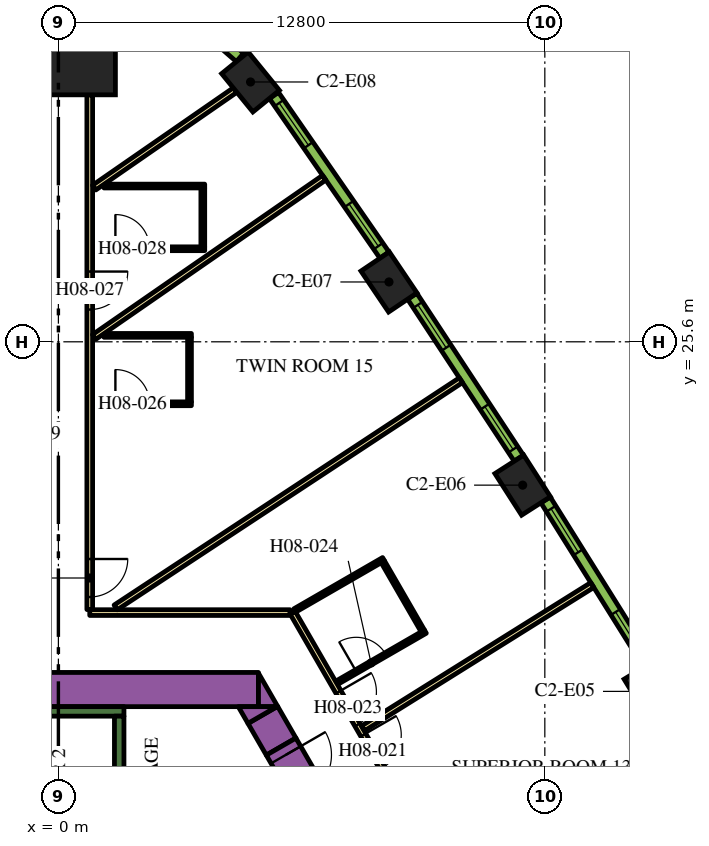
"""IFC4 building model, lengths in metres.
Left out: names, types, materials, properties, quantities, classifications, styles, units other than length and angle.
Written with IfcOpenShell. Run it as: python <this file> out.ifc"""

import sys

from ifc_helpers import new_model, si_unit, direction, frame, frame_2d, origin, origin_2d, place, context, subcontext, project, spatial, polyline, rectangle, outline, extrude, element, fill, save


model = new_model("IFC4")
c1 = context("Model", 3, precision=1e-05, world=origin(), true_north=direction((0.0, 1.0)))
c2 = subcontext(c1, "Body", "Model", "MODEL_VIEW")
j1 = project(units=[si_unit("LENGTHUNIT", "METRE"), si_unit("PLANEANGLEUNIT", "RADIAN")], contexts=[c1])
p1 = place(None, origin())
s1 = spatial("IfcSite", under=j1, at=p1, CompositionType="ELEMENT")
p2 = place(p1, origin())
s2 = spatial("IfcBuilding", under=s1, at=p2, CompositionType="ELEMENT")
p3 = place(p2, frame((0.0, 0.0, 107.1)))
s3 = spatial("IfcBuildingStorey", under=s2, at=p3, CompositionType="ELEMENT", Elevation=107.1)
p4 = place(p3, frame((0.0, 33.598, 0.0), z_axis=(0.0, 0.0, 1.0), x_axis=(0.0, 1.0, 0.0)))
e1 = element("IfcColumn", 1, at=p4, inside=s3, PredefinedType="COLUMN", context=c2, shape_type="SweptSolid", body=[
    extrude(rectangle(XDim=3.0, YDim=3.0, at=origin_2d()), origin(), (0.0, 0.0, 1.0), 3.9),
])
for number, where, z_axis, x_axis in (
    (2, (15.609, 16.402, 0.0), (0.0, 0.0, 1.0), (-0.52, 0.854, 0.0)),
    (3, (12.217, 21.828, 0.0), (0.0, 0.0, 1.0), (-0.54, 0.842, 0.0)),
    (4, (8.699, 27.174, 0.0), (0.0, 0.0, 1.0), (-0.559, 0.829, 0.0)),
    (5, (5.056, 32.437, 0.0), (0.0, 0.0, 1.0), (-0.632, 0.775, 0.0)),
):
    element("IfcColumn", number, at=place(p3, frame(where, z_axis=z_axis, x_axis=x_axis)), inside=s3, PredefinedType="COLUMN", context=c2, shape_type="SweptSolid", body=[
        extrude(rectangle(XDim=1.3, YDim=0.9, at=origin_2d()), origin(), (0.0, 0.0, 1.0), 3.9),
    ])
p5 = place(p3, frame((-4.224, 16.45, 0.0), z_axis=(0.0, 0.0, 1.0), x_axis=(1.0, 0.0, 0.0)))
e6 = element("IfcWall", 6, at=p5, inside=s3, PredefinedType="SOLIDWALL", context=c2, shape_type="SweptSolid", body=[
    extrude(rectangle(XDim=9.488, YDim=0.9, at=frame_2d((4.744, 0.0))), origin(), (0.0, 0.0, 1.0), 3.9),
])
p6 = place(p3, origin())
e7 = element("IfcWall", 7, at=p6, inside=s3, PredefinedType="SOLIDWALL", context=c2, shape_type="SweptSolid", body=[
    extrude(outline(polyline([(5.265, 16.0), (5.265, 16.88), (5.773, 16.0), (5.265, 16.0)])), origin(), (0.0, 0.0, 1.0), 3.9),
])
p7 = place(p3, frame((5.861, 14.949, 0.0), z_axis=(0.0, 0.0, 1.0), x_axis=(-0.50011719232, 0.865957732194, 0.0)))
e8 = element("IfcWall", 8, at=p7, inside=s3, PredefinedType="SOLIDWALL", context=c2, shape_type="SweptSolid", body=[
    extrude(rectangle(XDim=0.964, YDim=0.9, at=frame_2d((0.482, 0.0))), origin(), (0.0, 0.0, 1.0), 3.9),
])
e9 = element("IfcWall", 9, at=p6, inside=s3, PredefinedType="SOLIDWALL", context=c2, shape_type="SweptSolid", body=[
    extrude(outline(polyline([(4.734, 16.0), (5.75, 16.0), (4.988, 15.56), (4.734, 16.0)])), origin(), (0.0, 0.0, 1.0), 3.9),
])
p8 = place(p3, frame((-1.725, 15.875, 0.0), z_axis=(0.0, 0.0, 1.0), x_axis=(1.0, 0.0, 0.0)))
e10 = element("IfcWall", 10, at=p8, inside=s3, PredefinedType="SOLIDWALL", context=c2, shape_type="SweptSolid", body=[
    extrude(rectangle(XDim=3.45, YDim=0.25, at=frame_2d((1.725, 0.0))), origin(), (0.0, 0.0, 1.0), 3.9),
])
p9 = place(p3, frame((1.6, 8.95, 0.0), z_axis=(0.0, 0.0, 1.0), x_axis=(0.0, 1.0, 0.0)))
e11 = element("IfcWall", 11, at=p9, inside=s3, PredefinedType="SOLIDWALL", context=c2, shape_type="SweptSolid", body=[
    extrude(rectangle(XDim=6.8, YDim=0.25, at=frame_2d((3.4, 0.0))), origin(), (0.0, 0.0, 1.0), 3.9),
])
p10 = place(p3, frame((5.861, 14.948, 0.0), z_axis=(0.0, 0.0, 1.0), x_axis=(0.500062241894, -0.865989465428, 0.0)))
e12 = element("IfcWall", 12, at=p10, inside=s3, PredefinedType="SOLIDWALL", context=c2, shape_type="SweptSolid", body=[
    extrude(rectangle(XDim=1.7, YDim=0.9, at=frame_2d((0.85, 0.0))), origin(), (0.0, 0.0, 1.0), 3.9),
])
p11 = place(p10, frame((0.25, 0.0, 0.0)))
e13 = element("IfcOpeningElement", 13, at=p11, cuts=e12, PredefinedType="OPENING", context=c2, shape_type="SweptSolid", body=[
    extrude(rectangle(XDim=1.2, YDim=2.1, at=frame_2d((0.6, 1.05))), frame((0.0, 0.46, 0.0), z_axis=(0.0, -1.0, 0.0), x_axis=(1.0, 0.0, 0.0)), (0.0, 0.0, 1.0), 0.92),
])
p12 = place(p3, frame((6.163, 18.475, 0.0), z_axis=(0.0, 0.0, 1.0), x_axis=(0.500001317485, -0.866024643133, 0.0)))
e14 = element("IfcWall", 14, at=p12, inside=s3, PredefinedType="PARTITIONING", context=c2, shape_type="SweptSolid", body=[
    extrude(rectangle(XDim=25.767, YDim=0.15, at=frame_2d((12.883, 0.0))), origin(), (0.0, 0.0, 1.0), 2.75),
])
p13 = place(p12, frame((24.241, 0.0, 0.0)))
e15 = element("IfcOpeningElement", 15, at=p13, cuts=e14, PredefinedType="OPENING", context=c2, shape_type="SweptSolid", body=[
    extrude(rectangle(XDim=1.0, YDim=2.1, at=frame_2d((0.5, 1.05))), frame((0.0, 0.085, 0.0), z_axis=(0.0, -1.0, 0.0), x_axis=(1.0, 0.0, 0.0)), (0.0, 0.0, 1.0), 0.17),
])
p14 = place(p12, frame((13.144, 0.0, 0.0)))
e16 = element("IfcOpeningElement", 16, at=p14, cuts=e14, PredefinedType="OPENING", context=c2, shape_type="SweptSolid", body=[
    extrude(rectangle(XDim=1.0, YDim=2.1, at=frame_2d((0.5, 1.05))), frame((0.0, 0.085, 0.0), z_axis=(0.0, -1.0, 0.0), x_axis=(1.0, 0.0, 0.0)), (0.0, 0.0, 1.0), 0.17),
])
p15 = place(p12, frame((10.874, 0.0, 0.0)))
e17 = element("IfcOpeningElement", 17, at=p15, cuts=e14, PredefinedType="OPENING", context=c2, shape_type="SweptSolid", body=[
    extrude(rectangle(XDim=0.9, YDim=2.1, at=frame_2d((0.45, 1.05))), frame((0.0, 0.085, 0.0), z_axis=(0.0, -1.0, 0.0), x_axis=(1.0, 0.0, 0.0)), (0.0, 0.0, 1.0), 0.17),
])
p16 = place(p12, frame((3.718, 0.0, 0.0)))
e18 = element("IfcOpeningElement", 18, at=p16, cuts=e14, PredefinedType="OPENING", context=c2, shape_type="SweptSolid", body=[
    extrude(rectangle(XDim=1.0, YDim=2.1, at=frame_2d((0.5, 1.05))), frame((0.0, 0.085, 0.0), z_axis=(0.0, -1.0, 0.0), x_axis=(1.0, 0.0, 0.0)), (0.0, 0.0, 1.0), 0.17),
])
p17 = place(p12, frame((2.411, 0.0, 0.0)))
e19 = element("IfcOpeningElement", 19, at=p17, cuts=e14, PredefinedType="OPENING", context=c2, shape_type="SweptSolid", body=[
    extrude(rectangle(XDim=1.0, YDim=2.1, at=frame_2d((0.5, 1.05))), frame((0.0, 0.085, 0.0), z_axis=(0.0, -1.0, 0.0), x_axis=(1.0, 0.0, 0.0)), (0.0, 0.0, 1.0), 0.17),
])
p18 = place(p3, frame((0.825, 18.475, 0.0), z_axis=(0.0, 0.0, 1.0), x_axis=(1.0, 0.0, 0.0)))
e20 = element("IfcWall", 20, at=p18, inside=s3, PredefinedType="PARTITIONING", context=c2, shape_type="SweptSolid", body=[
    extrude(rectangle(XDim=5.268, YDim=0.15, at=frame_2d((2.634, 0.0))), origin(), (0.0, 0.0, 1.0), 2.75),
])
p19 = place(p3, frame((0.825, 32.098, 0.0), z_axis=(0.0, 0.0, 1.0), x_axis=(0.0, -1.0, 0.0)))
e21 = element("IfcWall", 21, at=p19, inside=s3, PredefinedType="PARTITIONING", context=c2, shape_type="SweptSolid", body=[
    extrude(rectangle(XDim=13.543, YDim=0.15, at=frame_2d((6.772, 0.0))), origin(), (0.0, 0.0, 1.0), 2.75),
])
p20 = place(p19, frame((12.213, 0.0, 0.0)))
e22 = element("IfcOpeningElement", 22, at=p20, cuts=e21, PredefinedType="OPENING", context=c2, shape_type="SweptSolid", body=[
    extrude(rectangle(XDim=1.0, YDim=2.1, at=frame_2d((0.5, 1.05))), frame((0.0, 0.085, 0.0), z_axis=(0.0, -1.0, 0.0), x_axis=(1.0, 0.0, 0.0)), (0.0, 0.0, 1.0), 0.17),
])
p21 = place(p19, frame((4.65, 0.0, 0.0)))
e23 = element("IfcOpeningElement", 23, at=p21, cuts=e21, PredefinedType="OPENING", context=c2, shape_type="SweptSolid", body=[
    extrude(rectangle(XDim=1.0, YDim=2.1, at=frame_2d((0.5, 1.05))), frame((0.0, 0.085, 0.0), z_axis=(0.0, -1.0, 0.0), x_axis=(1.0, 0.0, 0.0)), (0.0, 0.0, 1.0), 0.17),
])
p22 = place(p3, frame((6.994, 29.917, 0.0), z_axis=(0.0, 0.0, 1.0), x_axis=(-0.822255462494, -0.569118576747, 0.0)))
e24 = element("IfcWall", 24, at=p22, inside=s3, PredefinedType="PARTITIONING", context=c2, shape_type="SweptSolid", body=[
    extrude(rectangle(XDim=7.362, YDim=0.15, at=frame_2d((3.681, 0.0))), origin(), (0.0, 0.0, 1.0), 2.75),
])
p23 = place(p3, frame((10.592, 24.589, 0.0), z_axis=(0.0, 0.0, 1.0), x_axis=(-0.835337323748, -0.549737715236, 0.0)))
e25 = element("IfcWall", 25, at=p23, inside=s3, PredefinedType="PARTITIONING", context=c2, shape_type="SweptSolid", body=[
    extrude(rectangle(XDim=10.875, YDim=0.15, at=frame_2d((5.438, 0.0))), origin(), (0.0, 0.0, 1.0), 2.75),
])
p24 = place(p3, frame((4.649, 32.223, 0.0), z_axis=(0.0, 0.0, 1.0), x_axis=(-0.822262349475, -0.569108626394, 0.0)))
e26 = element("IfcWall", 26, at=p24, inside=s3, PredefinedType="PARTITIONING", context=c2, shape_type="SweptSolid", body=[
    extrude(rectangle(XDim=4.51, YDim=0.15, at=frame_2d((2.255, 0.0))), origin(), (0.0, 0.0, 1.0), 2.75),
])
p25 = place(p3, frame((14.049, 19.2, 0.0), z_axis=(0.0, 0.0, 1.0), x_axis=(-0.847955867271, -0.530066832731, 0.0)))
e27 = element("IfcWall", 27, at=p25, inside=s3, PredefinedType="PARTITIONING", context=c2, shape_type="SweptSolid", body=[
    extrude(rectangle(XDim=7.111, YDim=0.15, at=frame_2d((3.556, 0.0))), origin(), (0.0, 0.0, 1.0), 2.75),
])
p26 = place(p3, frame((7.318, 16.625, 0.0), z_axis=(0.0, 0.0, 1.0), x_axis=(0.866019956843, 0.50000943426, 0.0)))
e28 = element("IfcWall", 28, at=p26, inside=s3, PredefinedType="PARTITIONING", context=c2, shape_type="SweptSolid", body=[
    extrude(rectangle(XDim=2.7, YDim=0.1, at=frame_2d((1.35, 0.0))), origin(), (0.0, 0.0, 1.0), 2.75),
])
p27 = place(p26, frame((0.6, 0.0, 0.0)))
e29 = element("IfcOpeningElement", 29, at=p27, cuts=e28, PredefinedType="OPENING", context=c2, shape_type="SweptSolid", body=[
    extrude(rectangle(XDim=0.9, YDim=2.1, at=frame_2d((0.45, 1.05))), frame((0.0, 0.06, 0.0), z_axis=(0.0, -1.0, 0.0), x_axis=(1.0, 0.0, 0.0)), (0.0, 0.0, 1.0), 0.12),
])
p28 = place(p3, frame((9.588, 17.993, 0.0), z_axis=(0.0, 0.0, 1.0), x_axis=(-0.500027713859, 0.866009402589, 0.0)))
e30 = element("IfcWall", 30, at=p28, inside=s3, PredefinedType="PARTITIONING", context=c2, shape_type="SweptSolid", body=[
    extrude(rectangle(XDim=2.1, YDim=0.1, at=frame_2d((1.05, 0.0))), origin(), (0.0, 0.0, 1.0), 2.75),
])
p29 = place(p3, frame((6.218, 18.53, 0.0), z_axis=(0.0, 0.0, 1.0), x_axis=(0.86599734893, 0.500048589285, 0.0)))
e31 = element("IfcWall", 31, at=p29, inside=s3, PredefinedType="PARTITIONING", context=c2, shape_type="SweptSolid", body=[
    extrude(rectangle(XDim=2.7, YDim=0.1, at=frame_2d((1.35, 0.0))), origin(), (0.0, 0.0, 1.0), 2.75),
])
p30 = place(p3, frame((0.9, 23.969, 0.0), z_axis=(0.0, 0.0, 1.0), x_axis=(1.0, 0.0, 0.0)))
e32 = element("IfcWall", 32, at=p30, inside=s3, PredefinedType="PARTITIONING", context=c2, shape_type="SweptSolid", body=[
    extrude(rectangle(XDim=2.6, YDim=0.1, at=frame_2d((1.3, 0.0))), origin(), (0.0, 0.0, 1.0), 2.75),
])
p31 = place(p30, frame((0.6, 0.0, 0.0)))
e33 = element("IfcOpeningElement", 33, at=p31, cuts=e32, PredefinedType="OPENING", context=c2, shape_type="SweptSolid", body=[
    extrude(rectangle(XDim=0.9, YDim=2.1, at=frame_2d((0.45, 1.05))), frame((0.0, 0.06, 0.0), z_axis=(0.0, -1.0, 0.0), x_axis=(1.0, 0.0, 0.0)), (0.0, 0.0, 1.0), 0.12),
])
p32 = place(p3, frame((3.45, 24.019, 0.0), z_axis=(0.0, 0.0, 1.0), x_axis=(0.0, 1.0, 0.0)))
e34 = element("IfcWall", 34, at=p32, inside=s3, PredefinedType="PARTITIONING", context=c2, shape_type="SweptSolid", body=[
    extrude(rectangle(XDim=1.7, YDim=0.1, at=frame_2d((0.85, 0.0))), origin(), (0.0, 0.0, 1.0), 2.75),
])
p33 = place(p3, frame((1.2, 25.769, 0.0), z_axis=(0.0, 0.0, 1.0), x_axis=(1.0, 0.0, 0.0)))
e35 = element("IfcWall", 35, at=p33, inside=s3, PredefinedType="PARTITIONING", context=c2, shape_type="SweptSolid", body=[
    extrude(rectangle(XDim=2.3, YDim=0.1, at=frame_2d((1.15, 0.0))), origin(), (0.0, 0.0, 1.0), 2.75),
])
p34 = place(p3, frame((0.9, 28.048, 0.0), z_axis=(0.0, 0.0, 1.0), x_axis=(1.0, 0.0, 0.0)))
e36 = element("IfcWall", 36, at=p34, inside=s3, PredefinedType="PARTITIONING", context=c2, shape_type="SweptSolid", body=[
    extrude(rectangle(XDim=2.95, YDim=0.1, at=frame_2d((1.475, 0.0))), origin(), (0.0, 0.0, 1.0), 2.75),
])
p35 = place(p34, frame((0.6, 0.0, 0.0)))
e37 = element("IfcOpeningElement", 37, at=p35, cuts=e36, PredefinedType="OPENING", context=c2, shape_type="SweptSolid", body=[
    extrude(rectangle(XDim=0.9, YDim=2.1, at=frame_2d((0.45, 1.05))), frame((0.0, 0.06, 0.0), z_axis=(0.0, -1.0, 0.0), x_axis=(1.0, 0.0, 0.0)), (0.0, 0.0, 1.0), 0.12),
])
p36 = place(p3, frame((3.8, 28.098, 0.0), z_axis=(0.0, 0.0, 1.0), x_axis=(0.0, 1.0, 0.0)))
e38 = element("IfcWall", 38, at=p36, inside=s3, PredefinedType="PARTITIONING", context=c2, shape_type="SweptSolid", body=[
    extrude(rectangle(XDim=1.55, YDim=0.1, at=frame_2d((0.775, 0.0))), origin(), (0.0, 0.0, 1.0), 2.75),
])
p37 = place(p3, frame((1.2, 29.698, 0.0), z_axis=(0.0, 0.0, 1.0), x_axis=(1.0, 0.0, 0.0)))
e39 = element("IfcWall", 39, at=p37, inside=s3, PredefinedType="PARTITIONING", context=c2, shape_type="SweptSolid", body=[
    extrude(rectangle(XDim=2.65, YDim=0.1, at=frame_2d((1.325, 0.0))), origin(), (0.0, 0.0, 1.0), 2.75),
])
p38 = place(p3, frame((15.524, 17.114, 0.0), z_axis=(0.0, 0.0, 1.0), x_axis=(-0.530072082134, 0.847952585787, 0.0)))
e40 = element("IfcWall", 40, at=p38, inside=s3, PredefinedType="SOLIDWALL", context=c2, shape_type="SweptSolid", body=[
    extrude(rectangle(XDim=5.1, YDim=0.29, at=frame_2d((2.55, 0.0))), origin(), (0.0, 0.0, 1.0), 3.65),
])
p39 = place(p38, frame((0.273, 0.0, 0.9)))
e41 = element("IfcOpeningElement", 41, at=p39, cuts=e40, PredefinedType="OPENING", context=c2, shape_type="SweptSolid", body=[
    extrude(rectangle(XDim=1.35, YDim=2.15, at=frame_2d((0.675, 1.075))), frame((0.0, 0.155, 0.0), z_axis=(0.0, -1.0, 0.0), x_axis=(1.0, 0.0, 0.0)), (0.0, 0.0, 1.0), 0.31),
])
p40 = place(p38, frame((3.478, 0.0, 0.9)))
e42 = element("IfcOpeningElement", 42, at=p40, cuts=e40, PredefinedType="OPENING", context=c2, shape_type="SweptSolid", body=[
    extrude(rectangle(XDim=1.35, YDim=2.15, at=frame_2d((0.675, 1.075))), frame((0.0, 0.155, 0.0), z_axis=(0.0, -1.0, 0.0), x_axis=(1.0, 0.0, 0.0)), (0.0, 0.0, 1.0), 0.31),
])
p41 = place(p3, frame((12.115, 22.539, 0.0), z_axis=(0.0, 0.0, 1.0), x_axis=(-0.549741341923, 0.835334937005, 0.0)))
e43 = element("IfcWall", 43, at=p41, inside=s3, PredefinedType="SOLIDWALL", context=c2, shape_type="SweptSolid", body=[
    extrude(rectangle(XDim=5.1, YDim=0.29, at=frame_2d((2.55, 0.0))), origin(), (0.0, 0.0, 1.0), 3.65),
])
p42 = place(p41, frame((0.273, 0.0, 0.9)))
e44 = element("IfcOpeningElement", 44, at=p42, cuts=e43, PredefinedType="OPENING", context=c2, shape_type="SweptSolid", body=[
    extrude(rectangle(XDim=1.35, YDim=2.15, at=frame_2d((0.675, 1.075))), frame((0.0, 0.155, 0.0), z_axis=(0.0, -1.0, 0.0), x_axis=(1.0, 0.0, 0.0)), (0.0, 0.0, 1.0), 0.31),
])
p43 = place(p41, frame((3.478, 0.0, 0.9)))
e45 = element("IfcOpeningElement", 45, at=p43, cuts=e43, PredefinedType="OPENING", context=c2, shape_type="SweptSolid", body=[
    extrude(rectangle(XDim=1.35, YDim=2.15, at=frame_2d((0.675, 1.075))), frame((0.0, 0.155, 0.0), z_axis=(0.0, -1.0, 0.0), x_axis=(1.0, 0.0, 0.0)), (0.0, 0.0, 1.0), 0.31),
])
p44 = place(p3, frame((8.58, 27.882, 0.0), z_axis=(0.0, 0.0, 1.0), x_axis=(-0.569113019126, 0.822259309136, 0.0)))
e46 = element("IfcWall", 46, at=p44, inside=s3, PredefinedType="SOLIDWALL", context=c2, shape_type="SweptSolid", body=[
    extrude(rectangle(XDim=5.107, YDim=0.29, at=frame_2d((2.553, 0.0))), origin(), (0.0, 0.0, 1.0), 3.65),
])
p45 = place(p44, frame((0.285, 0.0, 0.9)))
e47 = element("IfcOpeningElement", 47, at=p45, cuts=e46, PredefinedType="OPENING", context=c2, shape_type="SweptSolid", body=[
    extrude(rectangle(XDim=1.35, YDim=2.15, at=frame_2d((0.675, 1.075))), frame((0.0, 0.155, 0.0), z_axis=(0.0, -1.0, 0.0), x_axis=(1.0, 0.0, 0.0)), (0.0, 0.0, 1.0), 0.31),
])
p46 = place(p44, frame((3.516, 0.0, 0.9)))
e48 = element("IfcOpeningElement", 48, at=p46, cuts=e46, PredefinedType="OPENING", context=c2, shape_type="SweptSolid", body=[
    extrude(rectangle(XDim=1.35, YDim=2.15, at=frame_2d((0.675, 1.075))), frame((0.0, 0.155, 0.0), z_axis=(0.0, -1.0, 0.0), x_axis=(1.0, 0.0, 0.0)), (0.0, 0.0, 1.0), 0.31),
])
p47 = place(p3, frame((4.778, 33.082, 0.0), z_axis=(0.0, 0.0, 1.0), x_axis=(-0.754882764627, 0.655859749999, 0.0)))
e49 = element("IfcWall", 49, at=p47, inside=s3, PredefinedType="SOLIDWALL", context=c2, shape_type="SweptSolid", body=[
    extrude(rectangle(XDim=1.82, YDim=0.29, at=frame_2d((0.91, 0.0))), origin(), (0.0, 0.0, 1.0), 3.65),
])
p48 = place(p47, frame((0.46, 0.0, 0.9)))
e50 = element("IfcOpeningElement", 50, at=p48, cuts=e49, PredefinedType="OPENING", context=c2, shape_type="SweptSolid", body=[
    extrude(rectangle(XDim=0.9, YDim=2.15, at=frame_2d((0.45, 1.075))), frame((0.0, 0.155, 0.0), z_axis=(0.0, -1.0, 0.0), x_axis=(1.0, 0.0, 0.0)), (0.0, 0.0, 1.0), 0.31),
])
p49 = place(p11, origin())
e51 = element("IfcDoor", 51, at=p49, inside=s3, OperationType="SINGLE_SWING_LEFT", PredefinedType="DOOR", context=c2, shape_type="SweptSolid", body=[
    extrude(rectangle(XDim=1.2, YDim=2.1, at=frame_2d((0.6, 1.05))), frame((0.0, 0.025, 0.0), z_axis=(0.0, -1.0, 0.0), x_axis=(1.0, 0.0, 0.0)), (0.0, 0.0, 1.0), 0.05),
])
fill(e13, e51)
p50 = place(p16, origin())
e52 = element("IfcDoor", 52, at=p50, inside=s3, OperationType="SINGLE_SWING_LEFT", PredefinedType="DOOR", context=c2, shape_type="SweptSolid", body=[
    extrude(rectangle(XDim=1.0, YDim=2.1, at=frame_2d((0.5, 1.05))), frame((0.0, 0.025, 0.0), z_axis=(0.0, -1.0, 0.0), x_axis=(1.0, 0.0, 0.0)), (0.0, 0.0, 1.0), 0.05),
])
fill(e18, e52)
p51 = place(p17, origin())
e53 = element("IfcDoor", 53, at=p51, inside=s3, OperationType="SINGLE_SWING_RIGHT", PredefinedType="DOOR", context=c2, shape_type="SweptSolid", body=[
    extrude(rectangle(XDim=1.0, YDim=2.1, at=frame_2d((0.5, 1.05))), frame((0.0, 0.025, 0.0), z_axis=(0.0, -1.0, 0.0), x_axis=(1.0, 0.0, 0.0)), (0.0, 0.0, 1.0), 0.05),
])
fill(e19, e53)
p52 = place(p27, origin())
e54 = element("IfcDoor", 54, at=p52, inside=s3, OperationType="SINGLE_SWING_LEFT", PredefinedType="DOOR", context=c2, shape_type="SweptSolid", body=[
    extrude(rectangle(XDim=0.9, YDim=2.1, at=frame_2d((0.45, 1.05))), frame((0.0, 0.025, 0.0), z_axis=(0.0, -1.0, 0.0), x_axis=(1.0, 0.0, 0.0)), (0.0, 0.0, 1.0), 0.05),
])
fill(e29, e54)
p53 = place(p20, origin())
e55 = element("IfcDoor", 55, at=p53, inside=s3, OperationType="SINGLE_SWING_RIGHT", PredefinedType="DOOR", context=c2, shape_type="SweptSolid", body=[
    extrude(rectangle(XDim=1.0, YDim=2.1, at=frame_2d((0.5, 1.05))), frame((0.0, 0.025, 0.0), z_axis=(0.0, -1.0, 0.0), x_axis=(1.0, 0.0, 0.0)), (0.0, 0.0, 1.0), 0.05),
])
fill(e22, e55)
p54 = place(p31, origin())
e56 = element("IfcDoor", 56, at=p54, inside=s3, OperationType="SINGLE_SWING_RIGHT", PredefinedType="DOOR", context=c2, shape_type="SweptSolid", body=[
    extrude(rectangle(XDim=0.9, YDim=2.1, at=frame_2d((0.45, 1.05))), frame((0.0, 0.025, 0.0), z_axis=(0.0, -1.0, 0.0), x_axis=(1.0, 0.0, 0.0)), (0.0, 0.0, 1.0), 0.05),
])
fill(e33, e56)
p55 = place(p21, origin())
e57 = element("IfcDoor", 57, at=p55, inside=s3, OperationType="SINGLE_SWING_RIGHT", PredefinedType="DOOR", context=c2, shape_type="SweptSolid", body=[
    extrude(rectangle(XDim=1.0, YDim=2.1, at=frame_2d((0.5, 1.05))), frame((0.0, 0.025, 0.0), z_axis=(0.0, -1.0, 0.0), x_axis=(1.0, 0.0, 0.0)), (0.0, 0.0, 1.0), 0.05),
])
fill(e23, e57)
p56 = place(p35, origin())
e58 = element("IfcDoor", 58, at=p56, inside=s3, OperationType="SINGLE_SWING_LEFT", PredefinedType="DOOR", context=c2, shape_type="SweptSolid", body=[
    extrude(rectangle(XDim=0.9, YDim=2.1, at=frame_2d((0.45, 1.05))), frame((0.0, 0.025, 0.0), z_axis=(0.0, -1.0, 0.0), x_axis=(1.0, 0.0, 0.0)), (0.0, 0.0, 1.0), 0.05),
])
fill(e37, e58)
p57 = place(p39, origin())
e59 = element("IfcWindow", 59, at=p57, inside=s3, PartitioningType="DOUBLE_PANEL_VERTICAL", PredefinedType="WINDOW", context=c2, shape_type="SweptSolid", body=[
    extrude(rectangle(XDim=1.35, YDim=2.15, at=frame_2d((0.675, 1.075))), frame((0.0, 0.015, 0.0), z_axis=(0.0, -1.0, 0.0), x_axis=(1.0, 0.0, 0.0)), (0.0, 0.0, 1.0), 0.06),
])
fill(e41, e59)
p58 = place(p40, origin())
e60 = element("IfcWindow", 60, at=p58, inside=s3, PartitioningType="DOUBLE_PANEL_VERTICAL", PredefinedType="WINDOW", context=c2, shape_type="SweptSolid", body=[
    extrude(rectangle(XDim=1.35, YDim=2.15, at=frame_2d((0.675, 1.075))), frame((0.0, 0.015, 0.0), z_axis=(0.0, -1.0, 0.0), x_axis=(1.0, 0.0, 0.0)), (0.0, 0.0, 1.0), 0.06),
])
fill(e42, e60)
p59 = place(p42, origin())
e61 = element("IfcWindow", 61, at=p59, inside=s3, PartitioningType="DOUBLE_PANEL_VERTICAL", PredefinedType="WINDOW", context=c2, shape_type="SweptSolid", body=[
    extrude(rectangle(XDim=1.35, YDim=2.15, at=frame_2d((0.675, 1.075))), frame((0.0, 0.015, 0.0), z_axis=(0.0, -1.0, 0.0), x_axis=(1.0, 0.0, 0.0)), (0.0, 0.0, 1.0), 0.06),
])
fill(e44, e61)
p60 = place(p43, origin())
e62 = element("IfcWindow", 62, at=p60, inside=s3, PartitioningType="DOUBLE_PANEL_VERTICAL", PredefinedType="WINDOW", context=c2, shape_type="SweptSolid", body=[
    extrude(rectangle(XDim=1.35, YDim=2.15, at=frame_2d((0.675, 1.075))), frame((0.0, 0.015, 0.0), z_axis=(0.0, -1.0, 0.0), x_axis=(1.0, 0.0, 0.0)), (0.0, 0.0, 1.0), 0.06),
])
fill(e45, e62)
p61 = place(p45, origin())
e63 = element("IfcWindow", 63, at=p61, inside=s3, PartitioningType="DOUBLE_PANEL_VERTICAL", PredefinedType="WINDOW", context=c2, shape_type="SweptSolid", body=[
    extrude(rectangle(XDim=1.35, YDim=2.15, at=frame_2d((0.675, 1.075))), frame((0.0, 0.015, 0.0), z_axis=(0.0, -1.0, 0.0), x_axis=(1.0, 0.0, 0.0)), (0.0, 0.0, 1.0), 0.06),
])
fill(e47, e63)
p62 = place(p46, origin())
e64 = element("IfcWindow", 64, at=p62, inside=s3, PartitioningType="DOUBLE_PANEL_VERTICAL", PredefinedType="WINDOW", context=c2, shape_type="SweptSolid", body=[
    extrude(rectangle(XDim=1.35, YDim=2.15, at=frame_2d((0.675, 1.075))), frame((0.0, 0.015, 0.0), z_axis=(0.0, -1.0, 0.0), x_axis=(1.0, 0.0, 0.0)), (0.0, 0.0, 1.0), 0.06),
])
fill(e48, e64)
save(model, sys.argv[1])
